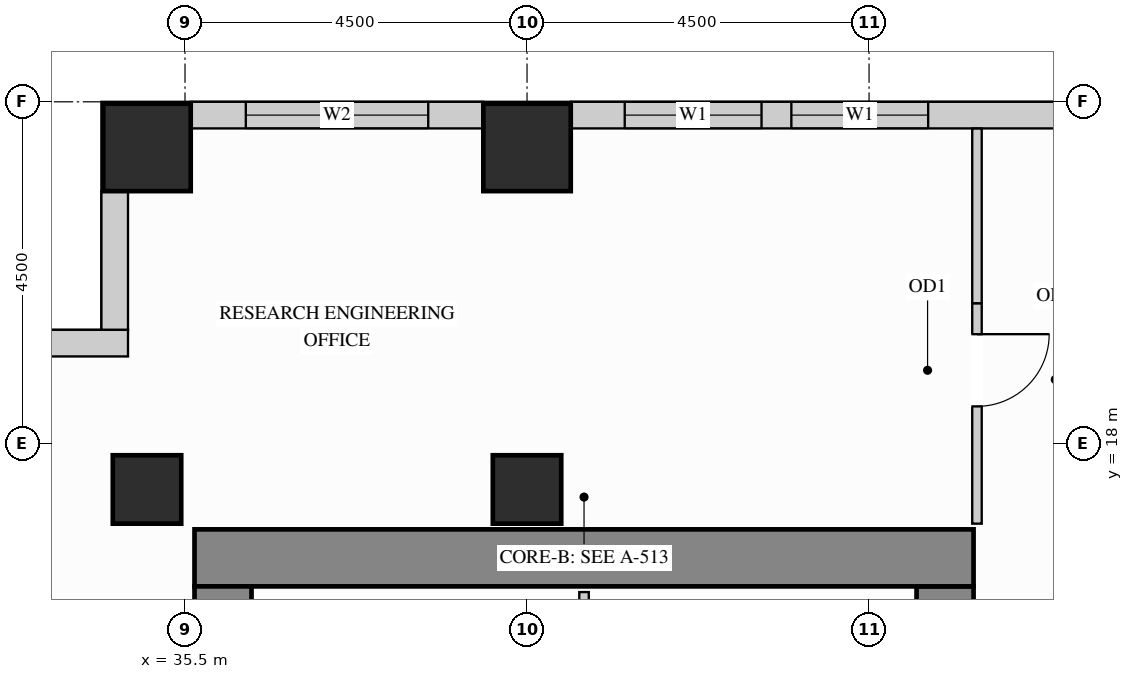
"""IFC4 building model, lengths in metres.
Left out: names, types, materials, properties, quantities, classifications, styles, units other than length and angle.
Written with IfcOpenShell. Run it as: python <this file> out.ifc"""

import sys

from ifc_helpers import new_model, si_unit, direction, frame, frame_2d, origin, origin_2d, place, context, subcontext, project, spatial, rectangle, extrude, source, transform, mapped, element, fill, save


model = new_model("IFC4")
c1 = context("Model", 3, precision=1e-05, world=origin(), true_north=direction((0.0, 1.0)))
c2 = subcontext(c1, "Body", "Model", "MODEL_VIEW")
j1 = project(units=[si_unit("LENGTHUNIT", "METRE"), si_unit("PLANEANGLEUNIT", "RADIAN")], contexts=[c1])
p1 = place(None, origin())
s1 = spatial("IfcSite", under=j1, at=p1, CompositionType="ELEMENT")
p2 = place(p1, origin())
s2 = spatial("IfcBuilding", under=s1, at=p2, CompositionType="ELEMENT")
p3 = place(p2, frame((0.0, 0.0, 95.4)))
s3 = spatial("IfcBuildingStorey", under=s2, at=p3, CompositionType="ELEMENT", Elevation=95.4)
m1 = source(origin(), c2, "Body", "SweptSolid", [
    extrude(rectangle(XDim=0.9, YDim=0.9, at=origin_2d()), origin(), (0.0, 0.0, 1.0), 3.38),
])
for number, where, z_axis, x_axis in (
    (1, (35.0, 17.4, 0.0), (0.0, 0.0, 1.0), (1.0, 0.0, 0.0)),
    (2, (40.0, 17.4, 0.0), (0.0, 0.0, 1.0), (1.0, 0.0, 0.0)),
):
    element("IfcColumn", number, at=place(p3, frame(where, z_axis=z_axis, x_axis=x_axis)), inside=s3, PredefinedType="COLUMN", context=c2, shape_type="MappedRepresentation", body=[
        mapped(m1, transform((0.0, 0.0, 0.0), x_axis=(1.0, 0.0, 0.0), y_axis=(0.0, 1.0, 0.0), z_axis=(0.0, 0.0, 1.0))),
    ])
m2 = source(origin(), c2, "Body", "SweptSolid", [
    extrude(rectangle(XDim=1.15, YDim=1.15, at=origin_2d()), origin(), (0.0, 0.0, 1.0), 3.38),
])
for number, where, z_axis, x_axis in (
    (3, (35.0, 21.9, 0.0), (0.0, 0.0, 1.0), (1.0, 0.0, 0.0)),
    (4, (40.0, 21.9, 0.0), (0.0, 0.0, 1.0), (1.0, 0.0, 0.0)),
):
    element("IfcColumn", number, at=place(p3, frame(where, z_axis=z_axis, x_axis=x_axis)), inside=s3, PredefinedType="COLUMN", context=c2, shape_type="MappedRepresentation", body=[
        mapped(m2, transform((0.0, 0.0, 0.0), x_axis=(1.0, 0.0, 0.0), y_axis=(0.0, 1.0, 0.0), z_axis=(0.0, 0.0, 1.0))),
    ])
m3 = source(origin(), c2, "Body", "SweptSolid", [
    extrude(rectangle(XDim=3.725, YDim=0.75, at=frame_2d((1.863, 0.0))), origin(), (0.0, 0.0, 1.0), 3.38),
])
p4 = place(p3, frame((45.5, 12.4, 0.0), z_axis=(0.0, 0.0, 1.0), x_axis=(0.0, 1.0, 0.0)))
e5 = element("IfcWall", 5, at=p4, inside=s3, PredefinedType="SHEAR", context=c2, shape_type="MappedRepresentation", body=[
    mapped(m3, transform((0.0, 0.0, 0.0), x_axis=(1.0, 0.0, 0.0), y_axis=(0.0, 1.0, 0.0), z_axis=(0.0, 0.0, 1.0))),
])
m4 = source(origin(), c2, "Body", "SweptSolid", [
    extrude(rectangle(XDim=10.25, YDim=0.75, at=frame_2d((5.125, 0.0))), origin(), (0.0, 0.0, 1.0), 3.38),
])
p5 = place(p3, frame((35.625, 16.5, 0.0), z_axis=(0.0, 0.0, 1.0), x_axis=(1.0, 0.0, 0.0)))
e6 = element("IfcWall", 6, at=p5, inside=s3, PredefinedType="SHEAR", context=c2, shape_type="MappedRepresentation", body=[
    mapped(m4, transform((0.0, 0.0, 0.0), x_axis=(1.0, 0.0, 0.0), y_axis=(0.0, 1.0, 0.0), z_axis=(0.0, 0.0, 1.0))),
])
p6 = place(p3, frame((36.0, 12.4, 0.0), z_axis=(0.0, 0.0, 1.0), x_axis=(0.0, 1.0, 0.0)))
e7 = element("IfcWall", 7, at=p6, inside=s3, PredefinedType="SHEAR", context=c2, shape_type="MappedRepresentation", body=[
    mapped(m3, transform((0.0, 0.0, 0.0), x_axis=(1.0, 0.0, 0.0), y_axis=(0.0, 1.0, 0.0), z_axis=(0.0, 0.0, 1.0))),
])
p7 = place(p3, frame((47.027, 22.325, 0.0), z_axis=(0.0, 0.0, 1.0), x_axis=(-1.0, 0.0, 0.0)))
e8 = element("IfcWall", 8, at=p7, inside=s3, PredefinedType="SOLIDWALL", context=c2, shape_type="SweptSolid", body=[
    extrude(rectangle(XDim=6.454, YDim=0.35, at=frame_2d((3.227, 0.0))), origin(), (0.0, 0.0, 1.0), 3.365),
])
p8 = place(p7, frame((1.749, 0.0, 0.78)))
e9 = element("IfcOpeningElement", 9, at=p8, cuts=e8, PredefinedType="OPENING", context=c2, shape_type="SweptSolid", body=[
    extrude(rectangle(XDim=1.8, YDim=2.1, at=frame_2d((0.9, 1.05))), frame((0.0, 0.185, 0.0), z_axis=(0.0, -1.0, 0.0), x_axis=(1.0, 0.0, 0.0)), (0.0, 0.0, 1.0), 0.37),
])
p9 = place(p7, frame((3.942, 0.0, 0.78)))
e10 = element("IfcOpeningElement", 10, at=p9, cuts=e8, PredefinedType="OPENING", context=c2, shape_type="SweptSolid", body=[
    extrude(rectangle(XDim=1.8, YDim=2.1, at=frame_2d((0.9, 1.05))), frame((0.0, 0.185, 0.0), z_axis=(0.0, -1.0, 0.0), x_axis=(1.0, 0.0, 0.0)), (0.0, 0.0, 1.0), 0.37),
])
p10 = place(p3, frame((39.427, 22.325, 0.0), z_axis=(0.0, 0.0, 1.0), x_axis=(-1.0, 0.0, 0.0)))
e11 = element("IfcWall", 11, at=p10, inside=s3, PredefinedType="SOLIDWALL", context=c2, shape_type="SweptSolid", body=[
    extrude(rectangle(XDim=3.854, YDim=0.35, at=frame_2d((1.927, 0.0))), origin(), (0.0, 0.0, 1.0), 3.365),
])
p11 = place(p10, frame((0.727, 0.0, 0.78)))
e12 = element("IfcOpeningElement", 12, at=p11, cuts=e11, PredefinedType="OPENING", context=c2, shape_type="SweptSolid", body=[
    extrude(rectangle(XDim=2.4, YDim=2.1, at=frame_2d((1.2, 1.05))), frame((0.0, 0.185, 0.0), z_axis=(0.0, -1.0, 0.0), x_axis=(1.0, 0.0, 0.0)), (0.0, 0.0, 1.0), 0.37),
])
m5 = source(origin(), c2, "Body", "SweptSolid", [
    extrude(rectangle(XDim=1.829, YDim=0.35, at=frame_2d((0.915, 0.0))), origin(), (0.0, 0.0, 1.0), 3.365),
])
p12 = place(p3, frame((34.575, 21.327, 0.0), z_axis=(0.0, 0.0, 1.0), x_axis=(0.0, -1.0, 0.0)))
e13 = element("IfcWall", 13, at=p12, inside=s3, PredefinedType="SOLIDWALL", context=c2, shape_type="MappedRepresentation", body=[
    mapped(m5, transform((0.0, 0.0, 0.0), x_axis=(1.0, 0.0, 0.0), y_axis=(0.0, 1.0, 0.0), z_axis=(0.0, 0.0, 1.0))),
])
p13 = place(p3, frame((34.75, 19.325, 0.0), z_axis=(0.0, 0.0, 1.0), x_axis=(-1.0, 0.0, 0.0)))
e14 = element("IfcWall", 14, at=p13, inside=s3, PredefinedType="SOLIDWALL", context=c2, shape_type="SweptSolid", body=[
    extrude(rectangle(XDim=15.6, YDim=0.35, at=frame_2d((7.8, 0.0))), origin(), (0.0, 0.0, 1.0), 3.365),
])
p14 = place(p13, frame((4.307, 0.0, 0.78)))
e15 = element("IfcOpeningElement", 15, at=p14, cuts=e14, PredefinedType="OPENING", context=c2, shape_type="SweptSolid", body=[
    extrude(rectangle(XDim=1.5, YDim=2.0, at=frame_2d((0.75, 1.0))), frame((0.0, 0.185, 0.0), z_axis=(0.0, -1.0, 0.0), x_axis=(1.0, 0.0, 0.0)), (0.0, 0.0, 1.0), 0.37),
])
p15 = place(p13, frame((9.793, 0.0, 0.78)))
e16 = element("IfcOpeningElement", 16, at=p15, cuts=e14, PredefinedType="OPENING", context=c2, shape_type="SweptSolid", body=[
    extrude(rectangle(XDim=1.5, YDim=2.0, at=frame_2d((0.75, 1.0))), frame((0.0, 0.185, 0.0), z_axis=(0.0, -1.0, 0.0), x_axis=(1.0, 0.0, 0.0)), (0.0, 0.0, 1.0), 0.37),
])
m6 = source(origin(), c2, "Body", "SweptSolid", [
    extrude(rectangle(XDim=1.93, YDim=0.125, at=frame_2d((0.965, 0.0))), origin(), (0.0, 0.0, 1.0), 3.365),
])
p16 = place(p3, frame((40.75, 14.12, 0.0), z_axis=(0.0, 0.0, 1.0), x_axis=(0.0, 1.0, 0.0)))
e17 = element("IfcWall", 17, at=p16, inside=s3, PredefinedType="PARTITIONING", context=c2, shape_type="MappedRepresentation", body=[
    mapped(m6, transform((0.0, 0.0, 0.0), x_axis=(1.0, 0.0, 0.0), y_axis=(0.0, 1.0, 0.0), z_axis=(0.0, 0.0, 1.0))),
])
p17 = place(p3, frame((45.92, 16.95, 0.0), z_axis=(0.0, 0.0, 1.0), x_axis=(0.0, 1.0, 0.0)))
e18 = element("IfcWall", 18, at=p17, inside=s3, PredefinedType="PARTITIONING", context=c2, shape_type="SweptSolid", body=[
    extrude(rectangle(XDim=2.9, YDim=0.125, at=frame_2d((1.45, 0.0))), origin(), (0.0, 0.0, 1.0), 3.365),
])
p18 = place(p17, frame((1.543, 0.0, 0.0)))
e19 = element("IfcOpeningElement", 19, at=p18, cuts=e18, PredefinedType="OPENING", context=c2, shape_type="SweptSolid", body=[
    extrude(rectangle(XDim=0.95, YDim=2.15, at=frame_2d((0.475, 1.075))), frame((0.0, 0.073, 0.0), z_axis=(0.0, -1.0, 0.0), x_axis=(1.0, 0.0, 0.0)), (0.0, 0.0, 1.0), 0.145),
])
m7 = source(origin(), c2, "Body", "SweptSolid", [
    extrude(rectangle(XDim=2.298, YDim=0.125, at=frame_2d((1.149, 0.0))), origin(), (0.0, 0.0, 1.0), 3.365),
])
p19 = place(p3, frame((45.92, 19.85, 0.0), z_axis=(0.0, 0.0, 1.0), x_axis=(0.0, 1.0, 0.0)))
e20 = element("IfcWall", 20, at=p19, inside=s3, PredefinedType="PARTITIONING", context=c2, shape_type="MappedRepresentation", body=[
    mapped(m7, transform((0.0, 0.0, 0.0), x_axis=(1.0, 0.0, 0.0), y_axis=(0.0, 1.0, 0.0), z_axis=(0.0, 0.0, 1.0))),
])
m8 = source(origin(), c2, "Body", "SweptSolid", [
    extrude(rectangle(XDim=0.95, YDim=2.15, at=frame_2d((0.475, 1.075))), frame((0.0, 0.025, 0.0), z_axis=(0.0, -1.0, 0.0), x_axis=(1.0, 0.0, 0.0)), (0.0, 0.0, 1.0), 0.05),
])
p20 = place(p18, origin())
e21 = element("IfcDoor", 21, at=p20, inside=s3, OperationType="SINGLE_SWING_RIGHT", PredefinedType="DOOR", context=c2, shape_type="MappedRepresentation", body=[
    mapped(m8, transform((0.0, 0.0, 0.0), x_axis=(1.0, 0.0, 0.0), y_axis=(0.0, 1.0, 0.0), z_axis=(0.0, 0.0, 1.0))),
])
fill(e19, e21)
m9 = source(origin(), c2, "Body", "SweptSolid", [
    extrude(rectangle(XDim=1.8, YDim=2.1, at=frame_2d((0.9, 1.05))), frame((0.0, 0.03, 0.0), z_axis=(0.0, -1.0, 0.0), x_axis=(1.0, 0.0, 0.0)), (0.0, 0.0, 1.0), 0.06),
])
p21 = place(p8, origin())
e22 = element("IfcWindow", 22, at=p21, inside=s3, PartitioningType="SINGLE_PANEL", PredefinedType="WINDOW", context=c2, shape_type="MappedRepresentation", body=[
    mapped(m9, transform((0.0, 0.0, 0.0), x_axis=(1.0, 0.0, 0.0), y_axis=(0.0, 1.0, 0.0), z_axis=(0.0, 0.0, 1.0))),
])
fill(e9, e22)
p22 = place(p9, origin())
e23 = element("IfcWindow", 23, at=p22, inside=s3, PartitioningType="SINGLE_PANEL", PredefinedType="WINDOW", context=c2, shape_type="MappedRepresentation", body=[
    mapped(m9, transform((0.0, 0.0, 0.0), x_axis=(1.0, 0.0, 0.0), y_axis=(0.0, 1.0, 0.0), z_axis=(0.0, 0.0, 1.0))),
])
fill(e10, e23)
m10 = source(origin(), c2, "Body", "SweptSolid", [
    extrude(rectangle(XDim=2.4, YDim=2.1, at=frame_2d((1.2, 1.05))), frame((0.0, 0.03, 0.0), z_axis=(0.0, -1.0, 0.0), x_axis=(1.0, 0.0, 0.0)), (0.0, 0.0, 1.0), 0.06),
])
p23 = place(p11, origin())
e24 = element("IfcWindow", 24, at=p23, inside=s3, PartitioningType="SINGLE_PANEL", PredefinedType="WINDOW", context=c2, shape_type="MappedRepresentation", body=[
    mapped(m10, transform((0.0, 0.0, 0.0), x_axis=(1.0, 0.0, 0.0), y_axis=(0.0, 1.0, 0.0), z_axis=(0.0, 0.0, 1.0))),
])
fill(e12, e24)
save(model, sys.argv[1])
